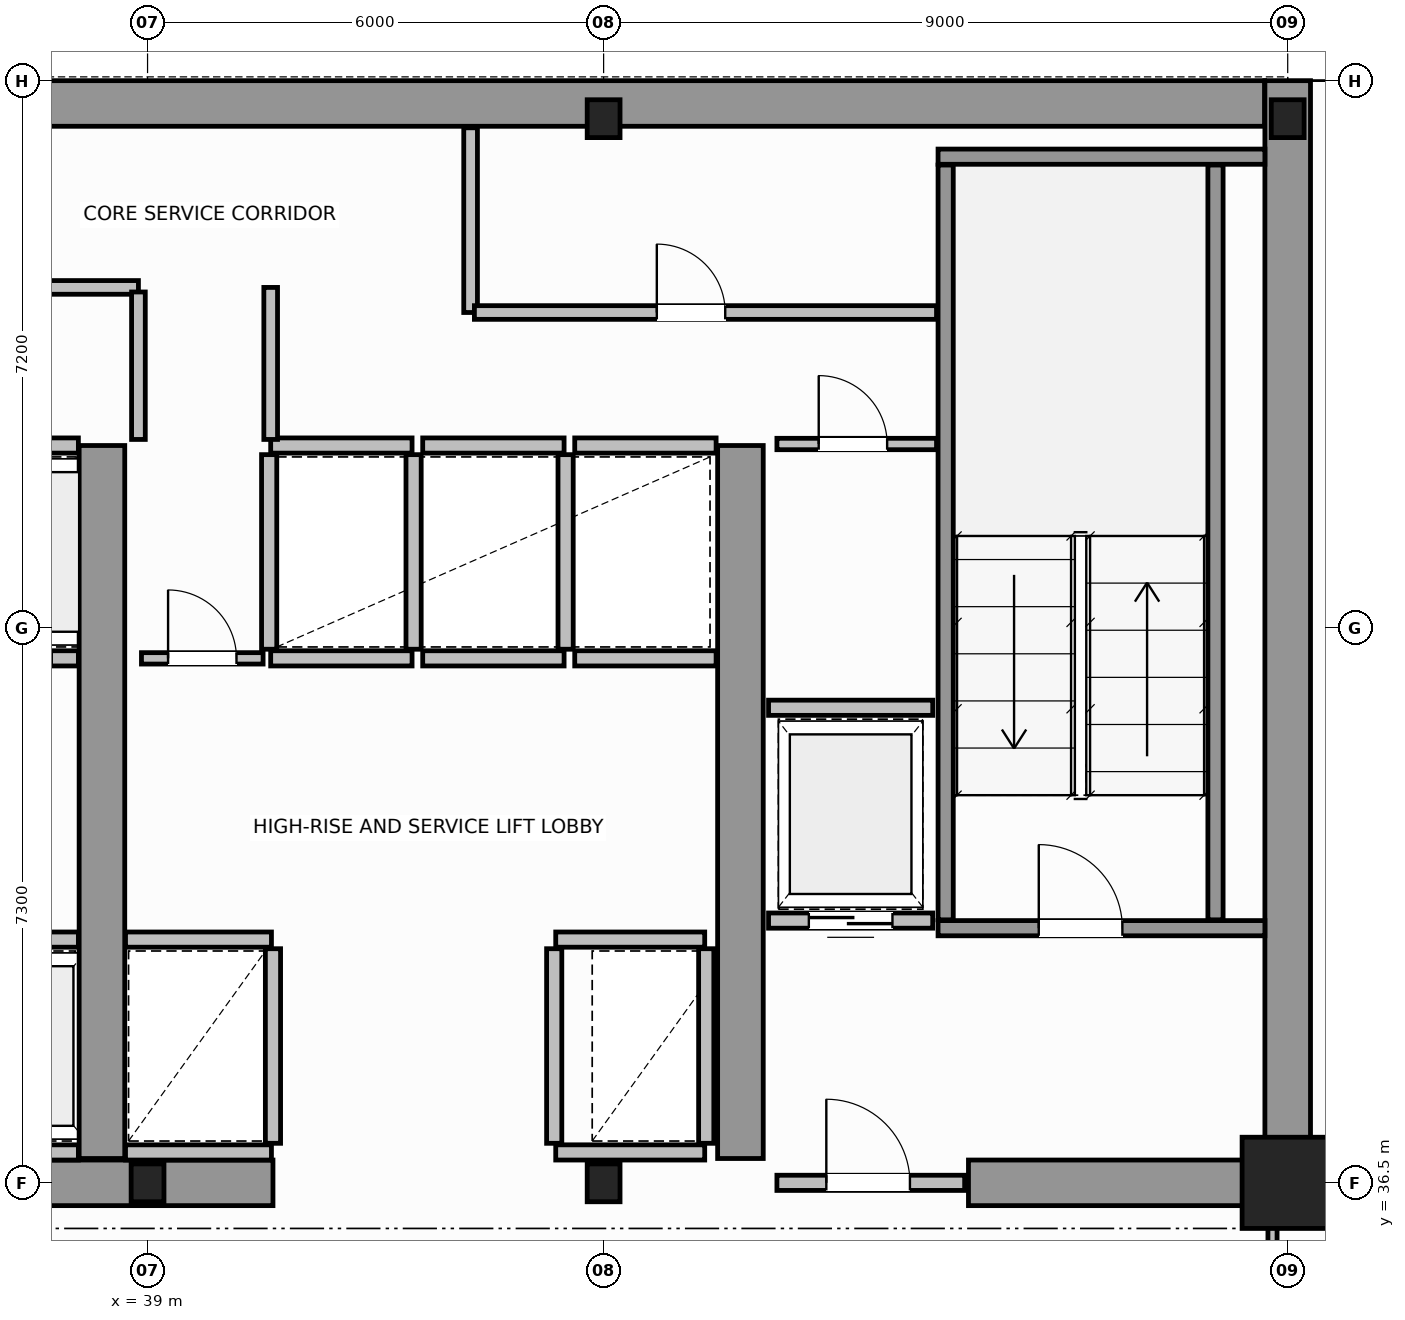
"""IFC4 building model, lengths in metres.
Left out: names, types, materials, properties, quantities, classifications, styles, units other than length and angle.
Written with IfcOpenShell. Run it as: python <this file> out.ifc"""

import sys

from ifc_helpers import new_model, si_unit, direction, frame, frame_2d, origin, origin_2d, place, context, subcontext, project, spatial, rectangle, i_section, extrude, source, transform, mapped, element, fill, save


model = new_model("IFC4")
c1 = context("Model", 3, precision=1e-05, world=origin(), true_north=direction((0.0, 1.0)))
c2 = subcontext(c1, "Body", "Model", "MODEL_VIEW")
j1 = project(units=[si_unit("LENGTHUNIT", "METRE"), si_unit("PLANEANGLEUNIT", "RADIAN")], contexts=[c1])
p1 = place(None, origin())
s1 = spatial("IfcSite", under=j1, at=p1, CompositionType="ELEMENT")
p2 = place(p1, origin())
s2 = spatial("IfcBuilding", under=s1, at=p2, CompositionType="ELEMENT")
p3 = place(p2, frame((0.0, 0.0, 169.0)))
s3 = spatial("IfcBuildingStorey", under=s2, at=p3, CompositionType="ELEMENT", Elevation=169.0)
m1 = source(origin(), c2, "Body", "SweptSolid", [
    extrude(i_section(OverallWidth=0.432, OverallDepth=0.498, WebThickness=0.055, FlangeThickness=0.068, FilletRadius=0.015, at=origin_2d()), origin(), (0.0, 0.0, 1.0), 3.8),
])
for number, where, z_axis, x_axis in (
    (1, (39.0, 36.5, 0.0), (0.0, 0.0, 1.0), (1.0, 0.0, 0.0)),
    (2, (45.0, 36.5, 0.0), (0.0, 0.0, 1.0), (1.0, 0.0, 0.0)),
):
    element("IfcColumn", number, at=place(p3, frame(where, z_axis=z_axis, x_axis=x_axis)), inside=s3, PredefinedType="COLUMN", context=c2, shape_type="MappedRepresentation", body=[
        mapped(m1, transform((0.0, 0.0, 0.0), scale=1.0)),
    ])
m2 = source(origin(), c2, "Body", "SweptSolid", [
    extrude(rectangle(XDim=1.2, YDim=1.2, at=origin_2d()), origin(), (0.0, 0.0, 1.0), 3.8),
])
p4 = place(p3, frame((54.0, 36.5, 0.0), z_axis=(0.0, 0.0, 1.0), x_axis=(1.0, 0.0, 0.0)))
e3 = element("IfcColumn", 3, at=p4, inside=s3, PredefinedType="COLUMN", context=c2, shape_type="MappedRepresentation", body=[
    mapped(m2, transform((0.0, 0.0, 0.0), scale=1.0)),
])
for number, where, z_axis, x_axis in (
    (4, (45.0, 50.5, 0.0), (0.0, 0.0, 1.0), (1.0, 0.0, 0.0)),
    (5, (54.0, 50.5, 0.0), (0.0, 0.0, 1.0), (1.0, 0.0, 0.0)),
):
    element("IfcColumn", number, at=place(p3, frame(where, z_axis=z_axis, x_axis=x_axis)), inside=s3, PredefinedType="COLUMN", context=c2, shape_type="MappedRepresentation", body=[
        mapped(m1, transform((0.0, 0.0, 0.0), scale=1.0)),
    ])
p5 = place(p3, frame((34.002, 50.7, 0.0), z_axis=(0.0, 0.0, 1.0), x_axis=(1.0, 0.0, 0.0)))
e6 = element("IfcWall", 6, at=p5, inside=s3, PredefinedType="SHEAR", context=c2, shape_type="SweptSolid", body=[
    extrude(rectangle(XDim=19.694, YDim=0.6, at=frame_2d((9.847, 0.0))), origin(), (0.0, 0.0, 1.0), 3.8),
])
p6 = place(p3, frame((54.0, 36.5, 0.0), z_axis=(0.0, 0.0, 1.0), x_axis=(0.0, 1.0, 0.0)))
e7 = element("IfcWall", 7, at=p6, inside=s3, PredefinedType="SHEAR", context=c2, shape_type="SweptSolid", body=[
    extrude(rectangle(XDim=14.5, YDim=0.6, at=frame_2d((7.25, 0.0))), origin(), (0.0, 0.0, 1.0), 3.8),
])
p7 = place(p3, frame((36.15, 36.5, 0.0), z_axis=(0.0, 0.0, 1.0), x_axis=(1.0, 0.0, 0.0)))
e8 = element("IfcWall", 8, at=p7, inside=s3, PredefinedType="SHEAR", context=c2, shape_type="SweptSolid", body=[
    extrude(rectangle(XDim=4.5, YDim=0.6, at=frame_2d((2.25, 0.0))), origin(), (0.0, 0.0, 1.0), 3.8),
])
p8 = place(p3, frame((49.8, 36.5, 0.0), z_axis=(0.0, 0.0, 1.0), x_axis=(1.0, 0.0, 0.0)))
e9 = element("IfcWall", 9, at=p8, inside=s3, PredefinedType="SHEAR", context=c2, shape_type="SweptSolid", body=[
    extrude(rectangle(XDim=3.88, YDim=0.6, at=frame_2d((1.94, 0.0))), origin(), (0.0, 0.0, 1.0), 2.58),
])
for number, where, z_axis, x_axis in (
    (10, (38.4, 36.82, 0.0), (0.0, 0.0, 1.0), (0.0, 1.0, 0.0)),
    (11, (46.8, 36.82, 0.0), (0.0, 0.0, 1.0), (0.0, 1.0, 0.0)),
):
    element("IfcWall", number, at=place(p3, frame(where, z_axis=z_axis, x_axis=x_axis)), inside=s3, PredefinedType="SHEAR", context=c2, shape_type="SweptSolid", body=[
        extrude(rectangle(XDim=9.38, YDim=0.6, at=frame_2d((4.69, 0.0))), origin(), (0.0, 0.0, 1.0), 3.8),
    ])
p9 = place(p3, frame((49.4, 39.85, 0.0), z_axis=(0.0, 0.0, 1.0), x_axis=(1.0, 0.0, 0.0)))
e12 = element("IfcWall", 12, at=p9, inside=s3, PredefinedType="SOLIDWALL", context=c2, shape_type="SweptSolid", body=[
    extrude(rectangle(XDim=4.3, YDim=0.2, at=frame_2d((2.15, 0.0))), origin(), (0.0, 0.0, 1.0), 3.8),
])
p10 = place(p9, frame((1.325, 0.0, 0.0)))
e13 = element("IfcOpeningElement", 13, at=p10, cuts=e12, PredefinedType="OPENING", context=c2, shape_type="SweptSolid", body=[
    extrude(rectangle(XDim=1.1, YDim=2.15, at=frame_2d((0.55, 1.075))), frame((0.0, 0.11, 0.0), z_axis=(0.0, -1.0, 0.0), x_axis=(1.0, 0.0, 0.0)), (0.0, 0.0, 1.0), 0.22),
])
p11 = place(p3, frame((49.4, 50.0, 0.0), z_axis=(0.0, 0.0, 1.0), x_axis=(1.0, 0.0, 0.0)))
e14 = element("IfcWall", 14, at=p11, inside=s3, PredefinedType="SOLIDWALL", context=c2, shape_type="SweptSolid", body=[
    extrude(rectangle(XDim=4.3, YDim=0.2, at=frame_2d((2.15, 0.0))), origin(), (0.0, 0.0, 1.0), 3.8),
])
for number, where, z_axis, x_axis in (
    (15, (49.5, 39.96, 0.0), (0.0, 0.0, 1.0), (0.0, 1.0, 0.0)),
    (16, (53.05, 39.96, 0.0), (0.0, 0.0, 1.0), (0.0, 1.0, 0.0)),
):
    element("IfcWall", number, at=place(p3, frame(where, z_axis=z_axis, x_axis=x_axis)), inside=s3, PredefinedType="SOLIDWALL", context=c2, shape_type="SweptSolid", body=[
        extrude(rectangle(XDim=9.93, YDim=0.2, at=frame_2d((4.965, 0.0))), origin(), (0.0, 0.0, 1.0), 3.8),
    ])
p12 = place(p3, frame((47.28, 36.5, 0.0), z_axis=(0.0, 0.0, 1.0), x_axis=(1.0, 0.0, 0.0)))
e17 = element("IfcWall", 17, at=p12, inside=s3, PredefinedType="SOLIDWALL", context=c2, shape_type="SweptSolid", body=[
    extrude(rectangle(XDim=2.47, YDim=0.2, at=frame_2d((1.235, 0.0))), origin(), (0.0, 0.0, 1.0), 2.57),
])
p13 = place(p12, frame((0.65, 0.0, 0.0)))
e18 = element("IfcOpeningElement", 18, at=p13, cuts=e17, PredefinedType="OPENING", context=c2, shape_type="SweptSolid", body=[
    extrude(rectangle(XDim=1.1, YDim=2.15, at=frame_2d((0.55, 1.075))), frame((0.0, 0.11, 0.0), z_axis=(0.0, -1.0, 0.0), x_axis=(1.0, 0.0, 0.0)), (0.0, 0.0, 1.0), 0.22),
])
p14 = place(p3, frame((36.17, 39.7, 0.0), z_axis=(0.0, 0.0, 1.0), x_axis=(1.0, 0.0, 0.0)))
e19 = element("IfcWall", 19, at=p14, inside=s3, PredefinedType="SOLIDWALL", context=c2, shape_type="SweptSolid", body=[
    extrude(rectangle(XDim=1.92, YDim=0.2, at=frame_2d((0.96, 0.0))), origin(), (0.0, 0.0, 1.0), 3.58),
])
p15 = place(p14, frame((0.41, 0.0, 0.0)))
e20 = element("IfcOpeningElement", 20, at=p15, cuts=e19, PredefinedType="OPENING", context=c2, shape_type="SweptSolid", body=[
    extrude(rectangle(XDim=1.1, YDim=2.15, at=frame_2d((0.55, 1.075))), frame((0.0, 0.11, 0.0), z_axis=(0.0, -1.0, 0.0), x_axis=(1.0, 0.0, 0.0)), (0.0, 0.0, 1.0), 0.22),
])
p16 = place(p3, frame((36.17, 36.9, 0.0), z_axis=(0.0, 0.0, 1.0), x_axis=(1.0, 0.0, 0.0)))
e21 = element("IfcWall", 21, at=p16, inside=s3, PredefinedType="SOLIDWALL", context=c2, shape_type="SweptSolid", body=[
    extrude(rectangle(XDim=1.92, YDim=0.2, at=frame_2d((0.96, 0.0))), origin(), (0.0, 0.0, 1.0), 3.58),
])
p17 = place(p3, frame((36.29, 43.4, 0.0), z_axis=(0.0, 0.0, 1.0), x_axis=(1.0, 0.0, 0.0)))
e22 = element("IfcWall", 22, at=p17, inside=s3, PredefinedType="SOLIDWALL", context=c2, shape_type="SweptSolid", body=[
    extrude(rectangle(XDim=1.8, YDim=0.2, at=frame_2d((0.9, 0.0))), origin(), (0.0, 0.0, 1.0), 3.58),
])
p18 = place(p17, frame((0.35, 0.0, 0.0)))
e23 = element("IfcOpeningElement", 23, at=p18, cuts=e22, PredefinedType="OPENING", context=c2, shape_type="SweptSolid", body=[
    extrude(rectangle(XDim=1.1, YDim=2.15, at=frame_2d((0.55, 1.075))), frame((0.0, 0.11, 0.0), z_axis=(0.0, -1.0, 0.0), x_axis=(1.0, 0.0, 0.0)), (0.0, 0.0, 1.0), 0.22),
])
p19 = place(p3, frame((36.29, 46.2, 0.0), z_axis=(0.0, 0.0, 1.0), x_axis=(1.0, 0.0, 0.0)))
e24 = element("IfcWall", 24, at=p19, inside=s3, PredefinedType="SOLIDWALL", context=c2, shape_type="SweptSolid", body=[
    extrude(rectangle(XDim=1.8, YDim=0.2, at=frame_2d((0.9, 0.0))), origin(), (0.0, 0.0, 1.0), 3.58),
])
for number, where, z_axis, x_axis in (
    (25, (38.71, 39.7, 0.0), (0.0, 0.0, 1.0), (1.0, 0.0, 0.0)),
    (26, (38.71, 36.9, 0.0), (0.0, 0.0, 1.0), (1.0, 0.0, 0.0)),
):
    element("IfcWall", number, at=place(p3, frame(where, z_axis=z_axis, x_axis=x_axis)), inside=s3, PredefinedType="SOLIDWALL", context=c2, shape_type="SweptSolid", body=[
        extrude(rectangle(XDim=1.92, YDim=0.2, at=frame_2d((0.96, 0.0))), origin(), (0.0, 0.0, 1.0), 3.58),
    ])
p20 = place(p3, frame((40.65, 37.02, 0.0), z_axis=(0.0, 0.0, 1.0), x_axis=(0.0, 1.0, 0.0)))
e27 = element("IfcWall", 27, at=p20, inside=s3, PredefinedType="SOLIDWALL", context=c2, shape_type="SweptSolid", body=[
    extrude(rectangle(XDim=2.56, YDim=0.2, at=frame_2d((1.28, 0.0))), origin(), (0.0, 0.0, 1.0), 3.58),
])
p21 = place(p3, frame((44.37, 39.7, 0.0), z_axis=(0.0, 0.0, 1.0), x_axis=(1.0, 0.0, 0.0)))
e28 = element("IfcWall", 28, at=p21, inside=s3, PredefinedType="SOLIDWALL", context=c2, shape_type="SweptSolid", body=[
    extrude(rectangle(XDim=1.96, YDim=0.2, at=frame_2d((0.98, 0.0))), origin(), (0.0, 0.0, 1.0), 3.58),
])
p22 = place(p3, frame((44.37, 36.9, 0.0), z_axis=(0.0, 0.0, 1.0), x_axis=(1.0, 0.0, 0.0)))
e29 = element("IfcWall", 29, at=p22, inside=s3, PredefinedType="SOLIDWALL", context=c2, shape_type="SweptSolid", body=[
    extrude(rectangle(XDim=1.96, YDim=0.2, at=frame_2d((0.98, 0.0))), origin(), (0.0, 0.0, 1.0), 2.57),
])
for number, where, z_axis, x_axis in (
    (30, (44.35, 37.02, 0.0), (0.0, 0.0, 1.0), (0.0, 1.0, 0.0)),
    (31, (46.35, 37.02, 0.0), (0.0, 0.0, 1.0), (0.0, 1.0, 0.0)),
):
    element("IfcWall", number, at=place(p3, frame(where, z_axis=z_axis, x_axis=x_axis)), inside=s3, PredefinedType="SOLIDWALL", context=c2, shape_type="SweptSolid", body=[
        extrude(rectangle(XDim=2.56, YDim=0.2, at=frame_2d((1.28, 0.0))), origin(), (0.0, 0.0, 1.0), 3.58),
    ])
for number, where, z_axis, x_axis in (
    (32, (40.62, 43.4, 0.0), (0.0, 0.0, 1.0), (1.0, 0.0, 0.0)),
    (33, (40.62, 46.2, 0.0), (0.0, 0.0, 1.0), (1.0, 0.0, 0.0)),
):
    element("IfcWall", number, at=place(p3, frame(where, z_axis=z_axis, x_axis=x_axis)), inside=s3, PredefinedType="SOLIDWALL", context=c2, shape_type="SweptSolid", body=[
        extrude(rectangle(XDim=1.86, YDim=0.2, at=frame_2d((0.93, 0.0))), origin(), (0.0, 0.0, 1.0), 3.58),
    ])
for number, where, z_axis, x_axis in (
    (34, (40.6, 43.52, 0.0), (0.0, 0.0, 1.0), (0.0, 1.0, 0.0)),
    (35, (42.5, 43.52, 0.0), (0.0, 0.0, 1.0), (0.0, 1.0, 0.0)),
):
    element("IfcWall", number, at=place(p3, frame(where, z_axis=z_axis, x_axis=x_axis)), inside=s3, PredefinedType="SOLIDWALL", context=c2, shape_type="SweptSolid", body=[
        extrude(rectangle(XDim=2.56, YDim=0.2, at=frame_2d((1.28, 0.0))), origin(), (0.0, 0.0, 1.0), 3.58),
    ])
for number, where, z_axis, x_axis in (
    (36, (42.62, 43.4, 0.0), (0.0, 0.0, 1.0), (1.0, 0.0, 0.0)),
    (37, (42.62, 46.2, 0.0), (0.0, 0.0, 1.0), (1.0, 0.0, 0.0)),
):
    element("IfcWall", number, at=place(p3, frame(where, z_axis=z_axis, x_axis=x_axis)), inside=s3, PredefinedType="SOLIDWALL", context=c2, shape_type="SweptSolid", body=[
        extrude(rectangle(XDim=1.86, YDim=0.2, at=frame_2d((0.93, 0.0))), origin(), (0.0, 0.0, 1.0), 3.58),
    ])
p23 = place(p3, frame((44.5, 43.52, 0.0), z_axis=(0.0, 0.0, 1.0), x_axis=(0.0, 1.0, 0.0)))
e38 = element("IfcWall", 38, at=p23, inside=s3, PredefinedType="SOLIDWALL", context=c2, shape_type="SweptSolid", body=[
    extrude(rectangle(XDim=2.56, YDim=0.2, at=frame_2d((1.28, 0.0))), origin(), (0.0, 0.0, 1.0), 3.58),
])
for number, where, z_axis, x_axis in (
    (39, (44.62, 43.4, 0.0), (0.0, 0.0, 1.0), (1.0, 0.0, 0.0)),
    (40, (44.62, 46.2, 0.0), (0.0, 0.0, 1.0), (1.0, 0.0, 0.0)),
):
    element("IfcWall", number, at=place(p3, frame(where, z_axis=z_axis, x_axis=x_axis)), inside=s3, PredefinedType="SOLIDWALL", context=c2, shape_type="SweptSolid", body=[
        extrude(rectangle(XDim=1.86, YDim=0.2, at=frame_2d((0.93, 0.0))), origin(), (0.0, 0.0, 1.0), 3.58),
    ])
p24 = place(p3, frame((47.17, 39.95, 0.0), z_axis=(0.0, 0.0, 1.0), x_axis=(1.0, 0.0, 0.0)))
e41 = element("IfcWall", 41, at=p24, inside=s3, PredefinedType="SOLIDWALL", context=c2, shape_type="SweptSolid", body=[
    extrude(rectangle(XDim=2.16, YDim=0.2, at=frame_2d((1.08, 0.0))), origin(), (0.0, 0.0, 1.0), 3.58),
])
p25 = place(p24, frame((0.53, 0.0, 0.0)))
e42 = element("IfcOpeningElement", 42, at=p25, cuts=e41, PredefinedType="OPENING", context=c2, shape_type="SweptSolid", body=[
    extrude(rectangle(XDim=1.1, YDim=2.15, at=frame_2d((0.55, 1.075))), frame((0.0, 0.11, 0.0), z_axis=(0.0, -1.0, 0.0), x_axis=(1.0, 0.0, 0.0)), (0.0, 0.0, 1.0), 0.22),
])
p26 = place(p3, frame((47.17, 42.75, 0.0), z_axis=(0.0, 0.0, 1.0), x_axis=(1.0, 0.0, 0.0)))
e43 = element("IfcWall", 43, at=p26, inside=s3, PredefinedType="SOLIDWALL", context=c2, shape_type="SweptSolid", body=[
    extrude(rectangle(XDim=2.16, YDim=0.2, at=frame_2d((1.08, 0.0))), origin(), (0.0, 0.0, 1.0), 3.58),
])
p27 = place(p3, frame((47.28, 46.22, 0.0), z_axis=(0.0, 0.0, 1.0), x_axis=(1.0, 0.0, 0.0)))
e44 = element("IfcWall", 44, at=p27, inside=s3, PredefinedType="PARTITIONING", context=c2, shape_type="SweptSolid", body=[
    extrude(rectangle(XDim=2.1, YDim=0.15, at=frame_2d((1.05, 0.0))), origin(), (0.0, 0.0, 1.0), 3.58),
])
p28 = place(p27, frame((0.55, 0.0, 0.0)))
e45 = element("IfcOpeningElement", 45, at=p28, cuts=e44, PredefinedType="OPENING", context=c2, shape_type="SweptSolid", body=[
    extrude(rectangle(XDim=0.9, YDim=2.1, at=frame_2d((0.45, 1.05))), frame((0.0, 0.085, 0.0), z_axis=(0.0, -1.0, 0.0), x_axis=(1.0, 0.0, 0.0)), (0.0, 0.0, 1.0), 0.17),
])
p29 = place(p3, frame((38.92, 43.4, 0.0), z_axis=(0.0, 0.0, 1.0), x_axis=(1.0, 0.0, 0.0)))
e46 = element("IfcWall", 46, at=p29, inside=s3, PredefinedType="PARTITIONING", context=c2, shape_type="SweptSolid", body=[
    extrude(rectangle(XDim=1.6, YDim=0.15, at=frame_2d((0.8, 0.0))), origin(), (0.0, 0.0, 1.0), 3.58),
])
p30 = place(p29, frame((0.35, 0.0, 0.0)))
e47 = element("IfcOpeningElement", 47, at=p30, cuts=e46, PredefinedType="OPENING", context=c2, shape_type="SweptSolid", body=[
    extrude(rectangle(XDim=0.9, YDim=2.1, at=frame_2d((0.45, 1.05))), frame((0.0, 0.085, 0.0), z_axis=(0.0, -1.0, 0.0), x_axis=(1.0, 0.0, 0.0)), (0.0, 0.0, 1.0), 0.17),
])
p31 = place(p3, frame((23.85, 48.28, 0.0), z_axis=(0.0, 0.0, 1.0), x_axis=(1.0, 0.0, 0.0)))
e48 = element("IfcWall", 48, at=p31, inside=s3, PredefinedType="PLUMBINGWALL", context=c2, shape_type="SweptSolid", body=[
    extrude(rectangle(XDim=15.03, YDim=0.18, at=frame_2d((7.515, 0.0))), origin(), (0.0, 0.0, 1.0), 3.58),
])
p32 = place(p31, frame((2.9, 0.0, 0.0)))
e49 = element("IfcOpeningElement", 49, at=p32, cuts=e48, PredefinedType="OPENING", context=c2, shape_type="SweptSolid", body=[
    extrude(rectangle(XDim=0.9, YDim=2.15, at=frame_2d((0.45, 1.075))), frame((0.0, 0.1, 0.0), z_axis=(0.0, -1.0, 0.0), x_axis=(1.0, 0.0, 0.0)), (0.0, 0.0, 1.0), 0.2),
])
p33 = place(p31, frame((10.4, 0.0, 0.0)))
e50 = element("IfcOpeningElement", 50, at=p33, cuts=e48, PredefinedType="OPENING", context=c2, shape_type="SweptSolid", body=[
    extrude(rectangle(XDim=0.9, YDim=2.15, at=frame_2d((0.45, 1.075))), frame((0.0, 0.1, 0.0), z_axis=(0.0, -1.0, 0.0), x_axis=(1.0, 0.0, 0.0)), (0.0, 0.0, 1.0), 0.2),
])
p34 = place(p3, frame((38.88, 46.28, 0.0), z_axis=(0.0, 0.0, 1.0), x_axis=(0.0, 1.0, 0.0)))
e51 = element("IfcWall", 51, at=p34, inside=s3, PredefinedType="PLUMBINGWALL", context=c2, shape_type="SweptSolid", body=[
    extrude(rectangle(XDim=1.94, YDim=0.18, at=frame_2d((0.97, 0.0))), origin(), (0.0, 0.0, 1.0), 3.58),
])
p35 = place(p3, frame((40.62, 46.28, 0.0), z_axis=(0.0, 0.0, 1.0), x_axis=(0.0, 1.0, 0.0)))
e52 = element("IfcWall", 52, at=p35, inside=s3, PredefinedType="PLUMBINGWALL", context=c2, shape_type="SweptSolid", body=[
    extrude(rectangle(XDim=2.0, YDim=0.18, at=frame_2d((1.0, 0.0))), origin(), (0.0, 0.0, 1.0), 3.58),
])
p36 = place(p3, frame((43.25, 47.95, 0.0), z_axis=(0.0, 0.0, 1.0), x_axis=(0.0, 1.0, 0.0)))
e53 = element("IfcWall", 53, at=p36, inside=s3, PredefinedType="PLUMBINGWALL", context=c2, shape_type="SweptSolid", body=[
    extrude(rectangle(XDim=2.43, YDim=0.18, at=frame_2d((1.215, 0.0))), origin(), (0.0, 0.0, 1.0), 3.58),
])
p37 = place(p3, frame((43.3, 47.95, 0.0), z_axis=(0.0, 0.0, 1.0), x_axis=(1.0, 0.0, 0.0)))
e54 = element("IfcWall", 54, at=p37, inside=s3, PredefinedType="PLUMBINGWALL", context=c2, shape_type="SweptSolid", body=[
    extrude(rectangle(XDim=6.08, YDim=0.18, at=frame_2d((3.04, 0.0))), origin(), (0.0, 0.0, 1.0), 3.58),
])
p38 = place(p37, frame((2.4, 0.0, 0.0)))
e55 = element("IfcOpeningElement", 55, at=p38, cuts=e54, PredefinedType="OPENING", context=c2, shape_type="SweptSolid", body=[
    extrude(rectangle(XDim=0.9, YDim=2.15, at=frame_2d((0.45, 1.075))), frame((0.0, 0.1, 0.0), z_axis=(0.0, -1.0, 0.0), x_axis=(1.0, 0.0, 0.0)), (0.0, 0.0, 1.0), 0.2),
])
p39 = place(p3, frame((53.8, 34.16, 0.0), z_axis=(0.0, 0.0, 1.0), x_axis=(0.0, 1.0, 0.0)))
e56 = element("IfcWall", 56, at=p39, inside=s3, PredefinedType="PARTITIONING", context=c2, shape_type="SweptSolid", body=[
    extrude(rectangle(XDim=2.28, YDim=0.12, at=frame_2d((1.14, 0.0))), origin(), (0.0, 0.0, 1.0), 3.58),
])
p40 = place(p39, frame((0.65, 0.0, 0.0)))
e57 = element("IfcOpeningElement", 57, at=p40, cuts=e56, PredefinedType="OPENING", context=c2, shape_type="SweptSolid", body=[
    extrude(rectangle(XDim=0.9, YDim=2.15, at=frame_2d((0.45, 1.075))), frame((0.0, 0.07, 0.0), z_axis=(0.0, -1.0, 0.0), x_axis=(1.0, 0.0, 0.0)), (0.0, 0.0, 1.0), 0.14),
])
m3 = source(origin(), c2, "Body", "SweptSolid", [
    extrude(rectangle(XDim=1.1, YDim=2.15, at=frame_2d((0.55, 1.075))), frame((0.0, 0.025, 0.0), z_axis=(0.0, -1.0, 0.0), x_axis=(1.0, 0.0, 0.0)), (0.0, 0.0, 1.0), 0.05),
])
p41 = place(p10, origin())
e58 = element("IfcDoor", 58, at=p41, inside=s3, OperationType="SINGLE_SWING_RIGHT", PredefinedType="DOOR", context=c2, shape_type="MappedRepresentation", body=[
    mapped(m3, transform((0.0, 0.0, 0.0), scale=1.0)),
])
fill(e13, e58)
p42 = place(p13, origin())
e59 = element("IfcDoor", 59, at=p42, inside=s3, OperationType="SINGLE_SWING_LEFT", PredefinedType="DOOR", context=c2, shape_type="MappedRepresentation", body=[
    mapped(m3, transform((0.0, 0.0, 0.0), scale=1.0)),
])
fill(e18, e59)
p43 = place(p25, origin())
e60 = element("IfcDoor", 60, at=p43, inside=s3, OperationType="DOUBLE_DOOR_SLIDING", PredefinedType="DOOR", context=c2, shape_type="MappedRepresentation", body=[
    mapped(m3, transform((0.0, 0.0, 0.0), scale=1.0)),
])
fill(e42, e60)
m4 = source(origin(), c2, "Body", "SweptSolid", [
    extrude(rectangle(XDim=0.9, YDim=2.1, at=frame_2d((0.45, 1.05))), frame((0.0, 0.025, 0.0), z_axis=(0.0, -1.0, 0.0), x_axis=(1.0, 0.0, 0.0)), (0.0, 0.0, 1.0), 0.05),
])
p44 = place(p28, origin())
e61 = element("IfcDoor", 61, at=p44, inside=s3, OperationType="SINGLE_SWING_RIGHT", PredefinedType="DOOR", context=c2, shape_type="MappedRepresentation", body=[
    mapped(m4, transform((0.0, 0.0, 0.0), scale=1.0)),
])
fill(e45, e61)
p45 = place(p30, origin())
e62 = element("IfcDoor", 62, at=p45, inside=s3, OperationType="SINGLE_SWING_LEFT", PredefinedType="DOOR", context=c2, shape_type="MappedRepresentation", body=[
    mapped(m4, transform((0.0, 0.0, 0.0), scale=1.0)),
])
fill(e47, e62)
m5 = source(origin(), c2, "Body", "SweptSolid", [
    extrude(rectangle(XDim=0.9, YDim=2.15, at=frame_2d((0.45, 1.075))), frame((0.0, 0.025, 0.0), z_axis=(0.0, -1.0, 0.0), x_axis=(1.0, 0.0, 0.0)), (0.0, 0.0, 1.0), 0.05),
])
p46 = place(p38, origin())
e63 = element("IfcDoor", 63, at=p46, inside=s3, OperationType="SINGLE_SWING_RIGHT", PredefinedType="DOOR", context=c2, shape_type="MappedRepresentation", body=[
    mapped(m5, transform((0.0, 0.0, 0.0), scale=1.0)),
])
fill(e55, e63)
save(model, sys.argv[1])
